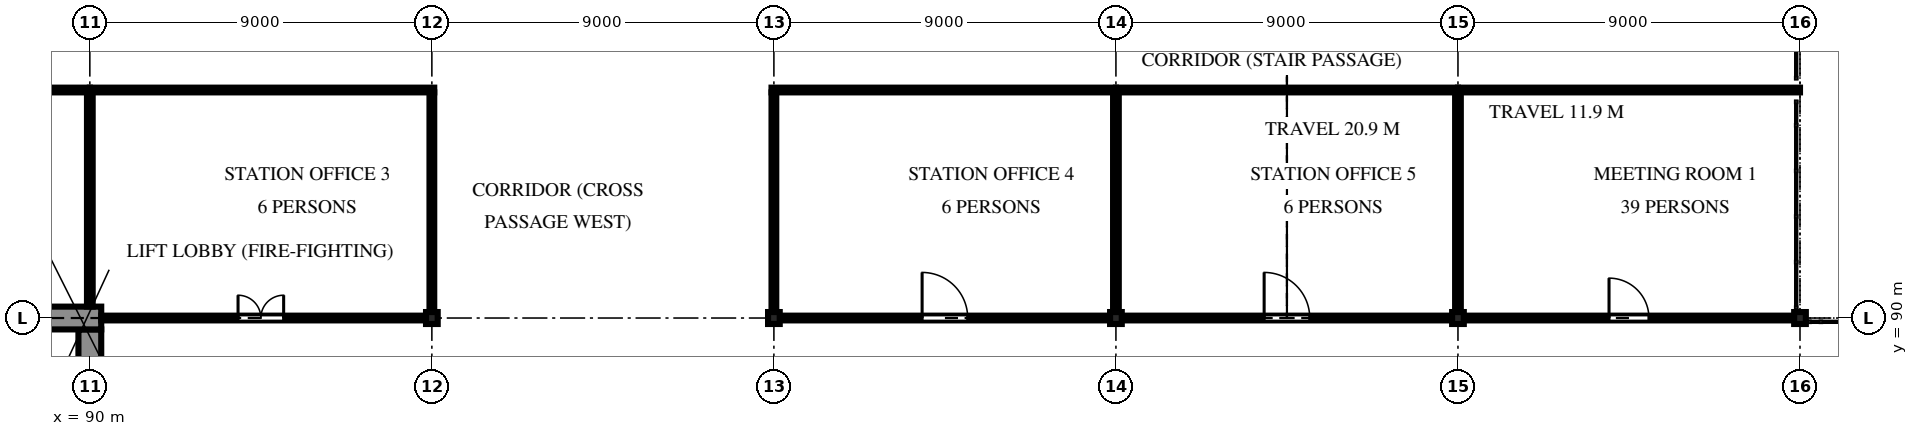
"""IFC4 building model, lengths in metres.
Left out: names, types, materials, properties, quantities, classifications, styles, units other than length and angle.
Written with IfcOpenShell. Run it as: python <this file> out.ifc"""

import sys

from ifc_helpers import new_model, si_unit, direction, frame, frame_2d, origin, origin_2d, place, context, subcontext, project, spatial, polyline, rectangle, i_section, outline, extrude, element, fill, save


model = new_model("IFC4")
c1 = context("Model", 3, precision=1e-05, world=origin(), true_north=direction((0.0, 1.0)))
c2 = subcontext(c1, "Body", "Model", "MODEL_VIEW")
j1 = project(units=[si_unit("LENGTHUNIT", "METRE"), si_unit("PLANEANGLEUNIT", "RADIAN")], contexts=[c1])
p1 = place(None, origin())
s1 = spatial("IfcSite", under=j1, at=p1, CompositionType="ELEMENT")
p2 = place(p1, origin())
s2 = spatial("IfcBuilding", under=s1, at=p2, CompositionType="ELEMENT")
p3 = place(p2, frame((0.0, 0.0, 7.5)))
s3 = spatial("IfcBuildingStorey", under=s2, at=p3, CompositionType="ELEMENT", Elevation=7.5)
for number, where, z_axis, x_axis in (
    (1, (99.0, 90.0, 0.0), (0.0, 0.0, 1.0), (1.0, 0.0, 0.0)),
    (2, (108.0, 90.0, 0.0), (0.0, 0.0, 1.0), (1.0, 0.0, 0.0)),
    (3, (117.0, 90.0, 0.0), (0.0, 0.0, 1.0), (1.0, 0.0, 0.0)),
    (4, (126.0, 90.0, 0.0), (0.0, 0.0, 1.0), (1.0, 0.0, 0.0)),
    (5, (135.0, 90.0, 0.0), (0.0, 0.0, 1.0), (1.0, 0.0, 0.0)),
):
    element("IfcColumn", number, at=place(p3, frame(where, z_axis=z_axis, x_axis=x_axis)), inside=s3, PredefinedType="COLUMN", context=c2, shape_type="SweptSolid", body=[
        extrude(i_section(OverallWidth=0.307, OverallDepth=0.314, WebThickness=0.012, FlangeThickness=0.019, FilletRadius=0.015, at=origin_2d()), origin(), (0.0, 0.0, 1.0), 4.2),
    ])
p4 = place(p3, frame((71.7, 90.0, 0.0), z_axis=(0.0, 0.0, 1.0), x_axis=(1.0, 0.0, 0.0)))
e6 = element("IfcWall", 6, at=p4, inside=s3, PredefinedType="SOLIDWALL", context=c2, shape_type="SweptSolid", body=[
    extrude(rectangle(XDim=18.6, YDim=0.6, at=frame_2d((9.3, 0.0))), origin(), (0.0, 0.0, 1.0), 4.2),
])
p5 = place(p3, frame((90.0, 81.3, 0.0), z_axis=(0.0, 0.0, 1.0), x_axis=(0.0, 1.0, 0.0)))
e7 = element("IfcWall", 7, at=p5, inside=s3, PredefinedType="SOLIDWALL", context=c2, shape_type="SweptSolid", body=[
    extrude(rectangle(XDim=8.4, YDim=0.6, at=frame_2d((4.2, 0.0))), origin(), (0.0, 0.0, 1.0), 4.2),
])
p6 = place(p5, frame((2.8, 0.0, 0.0)))
e8 = element("IfcOpeningElement", 8, at=p6, cuts=e7, PredefinedType="OPENING", context=c2, shape_type="SweptSolid", body=[
    extrude(rectangle(XDim=1.8, YDim=2.1, at=frame_2d((0.9, 1.05))), frame((0.0, 0.31, 0.0), z_axis=(0.0, -1.0, 0.0), x_axis=(1.0, 0.0, 0.0)), (0.0, 0.0, 1.0), 0.62),
])
p7 = place(p5, frame((0.55, 0.0, 0.0)))
e9 = element("IfcOpeningElement", 9, at=p7, cuts=e7, PredefinedType="OPENING", context=c2, shape_type="SweptSolid", body=[
    extrude(rectangle(XDim=0.9, YDim=2.1, at=frame_2d((0.45, 1.05))), frame((0.0, 0.31, 0.0), z_axis=(0.0, -1.0, 0.0), x_axis=(1.0, 0.0, 0.0)), (0.0, 0.0, 1.0), 0.62),
])
p8 = place(p3, frame((117.0, 96.0, 0.0), z_axis=(0.0, 0.0, 1.0), x_axis=(-1.0, 0.0, 0.0)))
e10 = element("IfcWall", 10, at=p8, inside=s3, PredefinedType="PARTITIONING", context=c2, shape_type="SweptSolid", body=[
    extrude(rectangle(XDim=9.062, YDim=0.125, at=frame_2d((4.531, 0.0))), origin(), (0.0, 0.0, 1.0), 3.307),
])
for number, where, z_axis, x_axis in (
    (11, (126.0, 96.0, 0.0), (0.0, 0.0, 1.0), (-1.0, 0.0, 0.0)),
    (12, (135.0, 96.0, 0.0), (0.0, 0.0, 1.0), (-1.0, 0.0, 0.0)),
):
    element("IfcWall", number, at=place(p3, frame(where, z_axis=z_axis, x_axis=x_axis)), inside=s3, PredefinedType="PARTITIONING", context=c2, shape_type="SweptSolid", body=[
        extrude(rectangle(XDim=9.0, YDim=0.125, at=frame_2d((4.5, 0.0))), origin(), (0.0, 0.0, 1.0), 3.307),
    ])
p9 = place(p3, frame((99.062, 96.0, 0.0), z_axis=(0.0, 0.0, 1.0), x_axis=(-1.0, 0.0, 0.0)))
e13 = element("IfcWall", 13, at=p9, inside=s3, PredefinedType="PARTITIONING", context=c2, shape_type="SweptSolid", body=[
    extrude(rectangle(XDim=9.062, YDim=0.125, at=frame_2d((4.531, 0.0))), origin(), (0.0, 0.0, 1.0), 3.307),
])
p10 = place(p3, frame((90.0, 96.0, 0.0), z_axis=(0.0, 0.0, 1.0), x_axis=(-1.0, 0.0, 0.0)))
e14 = element("IfcWall", 14, at=p10, inside=s3, PredefinedType="PARTITIONING", context=c2, shape_type="SweptSolid", body=[
    extrude(rectangle(XDim=9.0, YDim=0.125, at=frame_2d((4.5, 0.0))), origin(), (0.0, 0.0, 1.0), 3.307),
])
p11 = place(p10, frame((4.0, 0.0, 0.0)))
e15 = element("IfcOpeningElement", 15, at=p11, cuts=e14, PredefinedType="OPENING", context=c2, shape_type="SweptSolid", body=[
    extrude(rectangle(XDim=1.0, YDim=2.1, at=frame_2d((0.5, 1.05))), frame((0.0, 0.073, 0.0), z_axis=(0.0, -1.0, 0.0), x_axis=(1.0, 0.0, 0.0)), (0.0, 0.0, 1.0), 0.145),
])
p12 = place(p3, frame((108.154, 90.0, 0.0), z_axis=(0.0, 0.0, 1.0), x_axis=(1.0, 0.0, 0.0)))
e16 = element("IfcWall", 16, at=p12, inside=s3, PredefinedType="PARTITIONING", context=c2, shape_type="SweptSolid", body=[
    extrude(rectangle(XDim=8.692, YDim=0.125, at=frame_2d((4.346, 0.0))), origin(), (0.0, 0.0, 1.0), 3.307),
])
p13 = place(p12, frame((3.746, 0.0, 0.0)))
e17 = element("IfcOpeningElement", 17, at=p13, cuts=e16, PredefinedType="OPENING", context=c2, shape_type="SweptSolid", body=[
    extrude(rectangle(XDim=1.2, YDim=2.1, at=frame_2d((0.6, 1.05))), frame((0.0, 0.073, 0.0), z_axis=(0.0, -1.0, 0.0), x_axis=(1.0, 0.0, 0.0)), (0.0, 0.0, 1.0), 0.145),
])
p14 = place(p3, frame((117.154, 90.0, 0.0), z_axis=(0.0, 0.0, 1.0), x_axis=(1.0, 0.0, 0.0)))
e18 = element("IfcWall", 18, at=p14, inside=s3, PredefinedType="PARTITIONING", context=c2, shape_type="SweptSolid", body=[
    extrude(rectangle(XDim=8.692, YDim=0.125, at=frame_2d((4.346, 0.0))), origin(), (0.0, 0.0, 1.0), 3.307),
])
p15 = place(p14, frame((3.746, 0.0, 0.0)))
e19 = element("IfcOpeningElement", 19, at=p15, cuts=e18, PredefinedType="OPENING", context=c2, shape_type="SweptSolid", body=[
    extrude(rectangle(XDim=1.2, YDim=2.1, at=frame_2d((0.6, 1.05))), frame((0.0, 0.073, 0.0), z_axis=(0.0, -1.0, 0.0), x_axis=(1.0, 0.0, 0.0)), (0.0, 0.0, 1.0), 0.145),
])
p16 = place(p3, frame((126.154, 90.0, 0.0), z_axis=(0.0, 0.0, 1.0), x_axis=(1.0, 0.0, 0.0)))
e20 = element("IfcWall", 20, at=p16, inside=s3, PredefinedType="PARTITIONING", context=c2, shape_type="SweptSolid", body=[
    extrude(rectangle(XDim=8.692, YDim=0.125, at=frame_2d((4.346, 0.0))), origin(), (0.0, 0.0, 1.0), 3.307),
])
p17 = place(p16, frame((3.821, 0.0, 0.0)))
e21 = element("IfcOpeningElement", 21, at=p17, cuts=e20, PredefinedType="OPENING", context=c2, shape_type="SweptSolid", body=[
    extrude(rectangle(XDim=1.05, YDim=2.1, at=frame_2d((0.525, 1.05))), frame((0.0, 0.073, 0.0), z_axis=(0.0, -1.0, 0.0), x_axis=(1.0, 0.0, 0.0)), (0.0, 0.0, 1.0), 0.145),
])
p18 = place(p3, frame((90.302, 90.0, 0.0), z_axis=(0.0, 0.0, 1.0), x_axis=(1.0, 0.0, 0.0)))
e22 = element("IfcWall", 22, at=p18, inside=s3, PredefinedType="PARTITIONING", context=c2, shape_type="SweptSolid", body=[
    extrude(rectangle(XDim=8.544, YDim=0.125, at=frame_2d((4.272, 0.0))), origin(), (0.0, 0.0, 1.0), 3.307),
])
p19 = place(p18, frame((3.598, 0.0, 0.0)))
e23 = element("IfcOpeningElement", 23, at=p19, cuts=e22, PredefinedType="OPENING", context=c2, shape_type="SweptSolid", body=[
    extrude(rectangle(XDim=1.2, YDim=2.1, at=frame_2d((0.6, 1.05))), frame((0.0, 0.073, 0.0), z_axis=(0.0, -1.0, 0.0), x_axis=(1.0, 0.0, 0.0)), (0.0, 0.0, 1.0), 0.145),
])
for number, where, z_axis, x_axis in (
    (24, (108.0, 95.938, 0.0), (0.0, 0.0, 1.0), (0.0, -1.0, 0.0)),
    (25, (99.0, 90.157, 0.0), (0.0, 0.0, 1.0), (0.0, 1.0, 0.0)),
):
    element("IfcWall", number, at=place(p3, frame(where, z_axis=z_axis, x_axis=x_axis)), inside=s3, PredefinedType="PARTITIONING", context=c2, shape_type="SweptSolid", body=[
        extrude(rectangle(XDim=5.78, YDim=0.125, at=frame_2d((2.89, 0.0))), origin(), (0.0, 0.0, 1.0), 3.307),
    ])
p20 = place(p3, frame((90.0, 95.938, 0.0), z_axis=(0.0, 0.0, 1.0), x_axis=(0.0, -1.0, 0.0)))
e26 = element("IfcWall", 26, at=p20, inside=s3, PredefinedType="PARTITIONING", context=c2, shape_type="SweptSolid", body=[
    extrude(rectangle(XDim=5.635, YDim=0.15, at=frame_2d((2.818, 0.0))), origin(), (0.0, 0.0, 1.0), 3.307),
])
for number, where, z_axis, x_axis in (
    (27, (117.0, 95.938, 0.0), (0.0, 0.0, 1.0), (0.0, -1.0, 0.0)),
    (28, (126.0, 95.938, 0.0), (0.0, 0.0, 1.0), (0.0, -1.0, 0.0)),
):
    element("IfcWall", number, at=place(p3, frame(where, z_axis=z_axis, x_axis=x_axis)), inside=s3, PredefinedType="PARTITIONING", context=c2, shape_type="SweptSolid", body=[
        extrude(rectangle(XDim=5.78, YDim=0.15, at=frame_2d((2.89, 0.0))), origin(), (0.0, 0.0, 1.0), 3.307),
    ])
p21 = place(p19, origin())
e29 = element("IfcDoor", 29, at=p21, inside=s3, OperationType="DOUBLE_DOOR_SINGLE_SWING", PredefinedType="DOOR", context=c2, shape_type="SweptSolid", body=[
    extrude(outline(polyline([(0.0, 0.0), (0.07, 0.0), (0.07, 2.03), (1.13, 2.03), (1.13, 0.0), (1.2, 0.0), (1.2, 2.1), (0.0, 2.1), (0.0, 0.0)])), frame((0.0, 0.025, 0.0), z_axis=(0.0, -1.0, 0.0), x_axis=(1.0, 0.0, 0.0)), (0.0, 0.0, 1.0), 0.05),
    extrude(outline(polyline([(0.074, 0.01), (0.597, 0.01), (0.597, 2.026), (0.074, 2.026), (0.074, 0.01)]), holes=[polyline([(0.178, 0.373), (0.492, 0.373), (0.492, 1.784), (0.178, 1.784), (0.178, 0.373)])]), frame((0.0, 0.017, 0.0), z_axis=(0.0, -1.0, 0.0), x_axis=(1.0, 0.0, 0.0)), (0.0, 0.0, 1.0), 0.035),
    extrude(rectangle(XDim=0.314, YDim=1.411, at=frame_2d((0.335, 1.079))), frame((0.0, 0.009, 0.0), z_axis=(0.0, -1.0, 0.0), x_axis=(1.0, 0.0, 0.0)), (0.0, 0.0, 1.0), 0.017),
    extrude(outline(polyline([(0.603, 0.01), (1.126, 0.01), (1.126, 2.026), (0.603, 2.026), (0.603, 0.01)]), holes=[polyline([(0.708, 0.373), (1.021, 0.373), (1.021, 1.784), (0.708, 1.784), (0.708, 0.373)])]), frame((0.0, 0.017, 0.0), z_axis=(0.0, -1.0, 0.0), x_axis=(1.0, 0.0, 0.0)), (0.0, 0.0, 1.0), 0.035),
    extrude(rectangle(XDim=0.314, YDim=1.411, at=frame_2d((0.865, 1.079))), frame((0.0, 0.009, 0.0), z_axis=(0.0, -1.0, 0.0), x_axis=(1.0, 0.0, 0.0)), (0.0, 0.0, 1.0), 0.017),
])
fill(e23, e29)
p22 = place(p13, origin())
e30 = element("IfcDoor", 30, at=p22, inside=s3, OperationType="DOUBLE_DOOR_SINGLE_SWING", PredefinedType="DOOR", context=c2, shape_type="SweptSolid", body=[
    extrude(outline(polyline([(0.0, 0.0), (0.07, 0.0), (0.07, 2.03), (1.13, 2.03), (1.13, 0.0), (1.2, 0.0), (1.2, 2.1), (0.0, 2.1), (0.0, 0.0)])), frame((0.0, 0.025, 0.0), z_axis=(0.0, -1.0, 0.0), x_axis=(1.0, 0.0, 0.0)), (0.0, 0.0, 1.0), 0.05),
    extrude(outline(polyline([(0.074, 0.01), (0.597, 0.01), (0.597, 2.026), (0.074, 2.026), (0.074, 0.01)]), holes=[polyline([(0.178, 0.373), (0.492, 0.373), (0.492, 1.784), (0.178, 1.784), (0.178, 0.373)])]), frame((0.0, 0.017, 0.0), z_axis=(0.0, -1.0, 0.0), x_axis=(1.0, 0.0, 0.0)), (0.0, 0.0, 1.0), 0.035),
    extrude(rectangle(XDim=0.314, YDim=1.411, at=frame_2d((0.335, 1.079))), frame((0.0, 0.009, 0.0), z_axis=(0.0, -1.0, 0.0), x_axis=(1.0, 0.0, 0.0)), (0.0, 0.0, 1.0), 0.017),
    extrude(outline(polyline([(0.603, 0.01), (1.126, 0.01), (1.126, 2.026), (0.603, 2.026), (0.603, 0.01)]), holes=[polyline([(0.708, 0.373), (1.021, 0.373), (1.021, 1.784), (0.708, 1.784), (0.708, 0.373)])]), frame((0.0, 0.017, 0.0), z_axis=(0.0, -1.0, 0.0), x_axis=(1.0, 0.0, 0.0)), (0.0, 0.0, 1.0), 0.035),
    extrude(rectangle(XDim=0.314, YDim=1.411, at=frame_2d((0.865, 1.079))), frame((0.0, 0.009, 0.0), z_axis=(0.0, -1.0, 0.0), x_axis=(1.0, 0.0, 0.0)), (0.0, 0.0, 1.0), 0.017),
])
fill(e17, e30)
p23 = place(p15, origin())
e31 = element("IfcDoor", 31, at=p23, inside=s3, OperationType="DOUBLE_DOOR_SINGLE_SWING", PredefinedType="DOOR", context=c2, shape_type="SweptSolid", body=[
    extrude(outline(polyline([(0.0, 0.0), (0.07, 0.0), (0.07, 2.03), (1.13, 2.03), (1.13, 0.0), (1.2, 0.0), (1.2, 2.1), (0.0, 2.1), (0.0, 0.0)])), frame((0.0, 0.025, 0.0), z_axis=(0.0, -1.0, 0.0), x_axis=(1.0, 0.0, 0.0)), (0.0, 0.0, 1.0), 0.05),
    extrude(outline(polyline([(0.074, 0.01), (0.597, 0.01), (0.597, 2.026), (0.074, 2.026), (0.074, 0.01)]), holes=[polyline([(0.178, 0.373), (0.492, 0.373), (0.492, 1.784), (0.178, 1.784), (0.178, 0.373)])]), frame((0.0, 0.017, 0.0), z_axis=(0.0, -1.0, 0.0), x_axis=(1.0, 0.0, 0.0)), (0.0, 0.0, 1.0), 0.035),
    extrude(rectangle(XDim=0.314, YDim=1.411, at=frame_2d((0.335, 1.079))), frame((0.0, 0.009, 0.0), z_axis=(0.0, -1.0, 0.0), x_axis=(1.0, 0.0, 0.0)), (0.0, 0.0, 1.0), 0.017),
    extrude(outline(polyline([(0.603, 0.01), (1.126, 0.01), (1.126, 2.026), (0.603, 2.026), (0.603, 0.01)]), holes=[polyline([(0.708, 0.373), (1.021, 0.373), (1.021, 1.784), (0.708, 1.784), (0.708, 0.373)])]), frame((0.0, 0.017, 0.0), z_axis=(0.0, -1.0, 0.0), x_axis=(1.0, 0.0, 0.0)), (0.0, 0.0, 1.0), 0.035),
    extrude(rectangle(XDim=0.314, YDim=1.411, at=frame_2d((0.865, 1.079))), frame((0.0, 0.009, 0.0), z_axis=(0.0, -1.0, 0.0), x_axis=(1.0, 0.0, 0.0)), (0.0, 0.0, 1.0), 0.017),
])
fill(e19, e31)
p24 = place(p17, origin())
e32 = element("IfcDoor", 32, at=p24, inside=s3, OperationType="SINGLE_SWING_LEFT", PredefinedType="DOOR", context=c2, shape_type="SweptSolid", body=[
    extrude(outline(polyline([(0.0, 0.0), (0.07, 0.0), (0.07, 2.03), (0.98, 2.03), (0.98, 0.0), (1.05, 0.0), (1.05, 2.1), (0.0, 2.1), (0.0, 0.0)])), frame((0.0, 0.025, 0.0), z_axis=(0.0, -1.0, 0.0), x_axis=(1.0, 0.0, 0.0)), (0.0, 0.0, 1.0), 0.05),
    extrude(outline(polyline([(0.074, 0.01), (0.976, 0.01), (0.976, 2.026), (0.074, 2.026), (0.074, 0.01)]), holes=[polyline([(0.194, 0.16), (0.856, 0.16), (0.856, 1.01), (0.194, 1.01), (0.194, 0.16)]), polyline([(0.375, 1.16), (0.675, 1.16), (0.675, 1.76), (0.375, 1.76), (0.375, 1.16)])]), frame((0.0, 0.017, 0.0), z_axis=(0.0, -1.0, 0.0), x_axis=(1.0, 0.0, 0.0)), (0.0, 0.0, 1.0), 0.035),
    extrude(rectangle(XDim=0.662, YDim=0.85, at=frame_2d((0.525, 0.585))), frame((0.0, 0.009, 0.0), z_axis=(0.0, -1.0, 0.0), x_axis=(1.0, 0.0, 0.0)), (0.0, 0.0, 1.0), 0.017),
    extrude(rectangle(XDim=0.3, YDim=0.6, at=frame_2d((0.525, 1.46))), frame((0.0, 0.006, 0.0), z_axis=(0.0, -1.0, 0.0), x_axis=(1.0, 0.0, 0.0)), (0.0, 0.0, 1.0), 0.012),
])
fill(e21, e32)
save(model, sys.argv[1])
